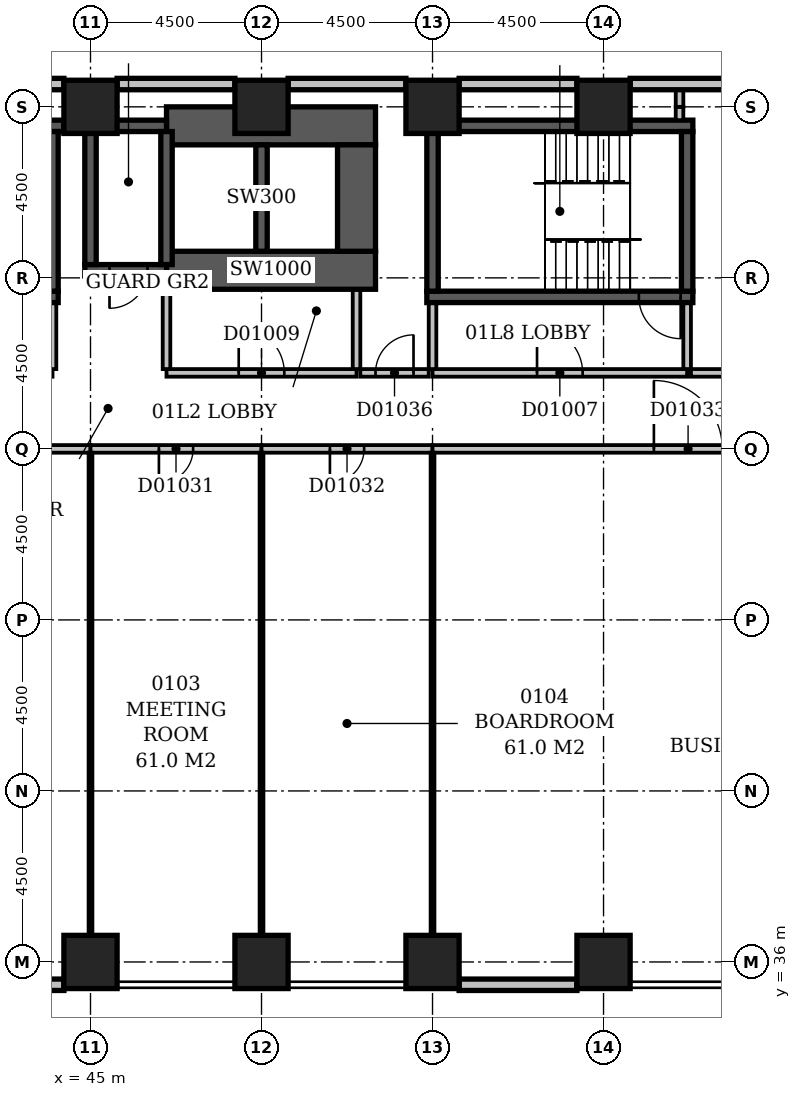
"""IFC4 building model, lengths in metres.
Left out: names, types, materials, properties, quantities, classifications, styles, units other than length and angle.
Written with IfcOpenShell. Run it as: python <this file> out.ifc"""

import sys

from ifc_helpers import new_model, si_unit, direction, frame, frame_2d, origin, origin_2d, place, context, subcontext, project, spatial, rectangle, extrude, element, fill, save


model = new_model("IFC4")
c1 = context("Model", 3, precision=1e-05, world=origin(), true_north=direction((0.0, 1.0)))
c2 = subcontext(c1, "Body", "Model", "MODEL_VIEW")
j1 = project(units=[si_unit("LENGTHUNIT", "METRE"), si_unit("PLANEANGLEUNIT", "RADIAN")], contexts=[c1])
p1 = place(None, origin())
s1 = spatial("IfcSite", under=j1, at=p1, CompositionType="ELEMENT")
p2 = place(p1, origin())
s2 = spatial("IfcBuilding", under=s1, at=p2, CompositionType="ELEMENT")
p3 = place(p2, frame((0.0, 0.0, 9.0)))
s3 = spatial("IfcBuildingStorey", under=s2, at=p3, CompositionType="ELEMENT", Elevation=9.0)
p4 = place(p3, frame((36.7, 58.0, -0.6), z_axis=(0.0, 0.0, 1.0), x_axis=(1.0, 0.0, 0.0)))
e1 = element("IfcWall", 1, at=p4, inside=s3, PredefinedType="SHEAR", context=c2, shape_type="SweptSolid", body=[
    extrude(rectangle(XDim=7.6, YDim=0.3, at=frame_2d((3.8, 0.0))), origin(), (0.0, 0.0, 1.0), 5.2),
])
p5 = place(p3, frame((37.15, 53.5, -0.6), z_axis=(0.0, 0.0, 1.0), x_axis=(1.0, 0.0, 0.0)))
e2 = element("IfcWall", 2, at=p5, inside=s3, PredefinedType="SHEAR", context=c2, shape_type="SweptSolid", body=[
    extrude(rectangle(XDim=7.0, YDim=0.3, at=frame_2d((3.5, 0.0))), origin(), (0.0, 0.0, 1.0), 5.2),
])
p6 = place(p5, frame((5.58, 0.0, 0.6)))
e3 = element("IfcOpeningElement", 3, at=p6, cuts=e2, PredefinedType="OPENING", context=c2, shape_type="SweptSolid", body=[
    extrude(rectangle(XDim=1.1, YDim=2.1, at=frame_2d((0.55, 1.05))), frame((0.0, 0.162, 0.0), z_axis=(0.0, -1.0, 0.0), x_axis=(1.0, 0.0, 0.0)), (0.0, 0.0, 1.0), 0.324),
])
p7 = place(p3, frame((44.0, 53.65, -0.6), z_axis=(0.0, 0.0, 1.0), x_axis=(0.0, 1.0, 0.0)))
e4 = element("IfcWall", 4, at=p7, inside=s3, PredefinedType="SHEAR", context=c2, shape_type="SweptSolid", body=[
    extrude(rectangle(XDim=4.2, YDim=0.3, at=frame_2d((2.1, 0.0))), origin(), (0.0, 0.0, 1.0), 5.2),
])
p8 = place(p3, frame((44.85, 54.2, -0.6), z_axis=(0.0, 0.0, 1.0), x_axis=(1.0, 0.0, 0.0)))
e5 = element("IfcWall", 5, at=p8, inside=s3, PredefinedType="SHEAR", context=c2, shape_type="SweptSolid", body=[
    extrude(rectangle(XDim=2.15, YDim=0.3, at=frame_2d((1.075, 0.0))), origin(), (0.0, 0.0, 1.0), 5.2),
])
p9 = place(p8, frame((0.65, 0.0, 0.6)))
e6 = element("IfcOpeningElement", 6, at=p9, cuts=e5, PredefinedType="OPENING", context=c2, shape_type="SweptSolid", body=[
    extrude(rectangle(XDim=1.0, YDim=2.1, at=frame_2d((0.5, 1.05))), frame((0.0, 0.162, 0.0), z_axis=(0.0, -1.0, 0.0), x_axis=(1.0, 0.0, 0.0)), (0.0, 0.0, 1.0), 0.324),
])
p10 = place(p3, frame((44.85, 58.0, -0.6), z_axis=(0.0, 0.0, 1.0), x_axis=(1.0, 0.0, 0.0)))
e7 = element("IfcWall", 7, at=p10, inside=s3, PredefinedType="SHEAR", context=c2, shape_type="SweptSolid", body=[
    extrude(rectangle(XDim=2.15, YDim=0.3, at=frame_2d((1.075, 0.0))), origin(), (0.0, 0.0, 1.0), 5.2),
])
p11 = place(p3, frame((45.0, 54.35, -0.6), z_axis=(0.0, 0.0, 1.0), x_axis=(0.0, 1.0, 0.0)))
e8 = element("IfcWall", 8, at=p11, inside=s3, PredefinedType="SHEAR", context=c2, shape_type="SweptSolid", body=[
    extrude(rectangle(XDim=3.5, YDim=0.3, at=frame_2d((1.75, 0.0))), origin(), (0.0, 0.0, 1.0), 5.2),
])
p12 = place(p3, frame((47.0, 54.2, -0.6), z_axis=(0.0, 0.0, 1.0), x_axis=(1.0, 0.0, 0.0)))
e9 = element("IfcWall", 9, at=p12, inside=s3, PredefinedType="SHEAR", context=c2, shape_type="SweptSolid", body=[
    extrude(rectangle(XDim=5.5, YDim=1.0, at=frame_2d((2.75, 0.0))), origin(), (0.0, 0.0, 1.0), 5.2),
])
p13 = place(p3, frame((47.0, 54.35, -0.6), z_axis=(0.0, 0.0, 1.0), x_axis=(0.0, 1.0, 0.0)))
e10 = element("IfcWall", 10, at=p13, inside=s3, PredefinedType="SHEAR", context=c2, shape_type="SweptSolid", body=[
    extrude(rectangle(XDim=3.5, YDim=0.3, at=frame_2d((1.75, 0.0))), origin(), (0.0, 0.0, 1.0), 5.2),
])
p14 = place(p3, frame((47.0, 58.0, -0.6), z_axis=(0.0, 0.0, 1.0), x_axis=(1.0, 0.0, 0.0)))
e11 = element("IfcWall", 11, at=p14, inside=s3, PredefinedType="SHEAR", context=c2, shape_type="SweptSolid", body=[
    extrude(rectangle(XDim=5.5, YDim=1.0, at=frame_2d((2.75, 0.0))), origin(), (0.0, 0.0, 1.0), 5.2),
])
p15 = place(p3, frame((49.5, 54.7, -0.6), z_axis=(0.0, 0.0, 1.0), x_axis=(0.0, 1.0, 0.0)))
e12 = element("IfcWall", 12, at=p15, inside=s3, PredefinedType="SHEAR", context=c2, shape_type="SweptSolid", body=[
    extrude(rectangle(XDim=2.8, YDim=0.3, at=frame_2d((1.4, 0.0))), origin(), (0.0, 0.0, 1.0), 5.2),
])
p16 = place(p3, frame((52.0, 54.7, -0.6), z_axis=(0.0, 0.0, 1.0), x_axis=(0.0, 1.0, 0.0)))
e13 = element("IfcWall", 13, at=p16, inside=s3, PredefinedType="SHEAR", context=c2, shape_type="SweptSolid", body=[
    extrude(rectangle(XDim=2.8, YDim=1.0, at=frame_2d((1.4, 0.0))), origin(), (0.0, 0.0, 1.0), 5.2),
])
p17 = place(p3, frame((53.85, 53.5, -0.6), z_axis=(0.0, 0.0, 1.0), x_axis=(1.0, 0.0, 0.0)))
e14 = element("IfcWall", 14, at=p17, inside=s3, PredefinedType="SHEAR", context=c2, shape_type="SweptSolid", body=[
    extrude(rectangle(XDim=7.0, YDim=0.3, at=frame_2d((3.5, 0.0))), origin(), (0.0, 0.0, 1.0), 5.2),
])
p18 = place(p17, frame((5.58, 0.0, 0.6)))
e15 = element("IfcOpeningElement", 15, at=p18, cuts=e14, PredefinedType="OPENING", context=c2, shape_type="SweptSolid", body=[
    extrude(rectangle(XDim=1.1, YDim=2.1, at=frame_2d((0.55, 1.05))), frame((0.0, 0.162, 0.0), z_axis=(0.0, -1.0, 0.0), x_axis=(1.0, 0.0, 0.0)), (0.0, 0.0, 1.0), 0.324),
])
p19 = place(p3, frame((53.85, 58.0, -0.6), z_axis=(0.0, 0.0, 1.0), x_axis=(1.0, 0.0, 0.0)))
e16 = element("IfcWall", 16, at=p19, inside=s3, PredefinedType="SHEAR", context=c2, shape_type="SweptSolid", body=[
    extrude(rectangle(XDim=7.0, YDim=0.3, at=frame_2d((3.5, 0.0))), origin(), (0.0, 0.0, 1.0), 5.2),
])
for number, where, z_axis, x_axis in (
    (17, (54.0, 53.65, -0.6), (0.0, 0.0, 1.0), (0.0, 1.0, 0.0)),
    (18, (60.7, 53.65, -0.6), (0.0, 0.0, 1.0), (0.0, 1.0, 0.0)),
):
    element("IfcWall", number, at=place(p3, frame(where, z_axis=z_axis, x_axis=x_axis)), inside=s3, PredefinedType="SHEAR", context=c2, shape_type="SweptSolid", body=[
        extrude(rectangle(XDim=4.2, YDim=0.3, at=frame_2d((2.1, 0.0))), origin(), (0.0, 0.0, 1.0), 5.2),
    ])
for number, where, z_axis, x_axis in (
    (19, (45.0, 36.0, -0.6), (0.0, 0.0, 1.0), (1.0, 0.0, 0.0)),
    (20, (49.5, 36.0, -0.6), (0.0, 0.0, 1.0), (1.0, 0.0, 0.0)),
    (21, (54.0, 36.0, -0.6), (0.0, 0.0, 1.0), (1.0, 0.0, 0.0)),
    (22, (58.5, 36.0, -0.6), (0.0, 0.0, 1.0), (1.0, 0.0, 0.0)),
    (23, (45.0, 58.5, -0.6), (0.0, 0.0, 1.0), (1.0, 0.0, 0.0)),
    (24, (49.5, 58.5, -0.6), (0.0, 0.0, 1.0), (1.0, 0.0, 0.0)),
    (25, (54.0, 58.5, -0.6), (0.0, 0.0, 1.0), (1.0, 0.0, 0.0)),
    (26, (58.5, 58.5, -0.6), (0.0, 0.0, 1.0), (1.0, 0.0, 0.0)),
):
    element("IfcColumn", number, at=place(p3, frame(where, z_axis=z_axis, x_axis=x_axis)), inside=s3, PredefinedType="COLUMN", context=c2, shape_type="SweptSolid", body=[
        extrude(rectangle(XDim=1.4, YDim=1.4, at=origin_2d()), origin(), (0.0, 0.0, 1.0), 5.2),
    ])
p20 = place(p3, frame((43.025, 35.4, 0.0), z_axis=(0.0, 0.0, 1.0), x_axis=(1.0, 0.0, 0.0)))
e27 = element("IfcWall", 27, at=p20, inside=s3, PredefinedType="STANDARD", context=c2, shape_type="SweptSolid", body=[
    extrude(rectangle(XDim=1.275, YDim=0.3, at=frame_2d((0.638, 0.0))), origin(), (0.0, 0.0, 1.0), 3.9),
])
for number, where, z_axis, x_axis in (
    (28, (54.7, 35.4, 0.0), (0.0, 0.0, 1.0), (1.0, 0.0, 0.0)),
    (29, (62.3, 59.1, 0.0), (0.0, 0.0, 1.0), (-1.0, 0.0, 0.0)),
    (30, (57.8, 59.1, 0.0), (0.0, 0.0, 1.0), (-1.0, 0.0, 0.0)),
    (31, (53.3, 59.1, 0.0), (0.0, 0.0, 1.0), (-1.0, 0.0, 0.0)),
    (32, (48.8, 59.1, 0.0), (0.0, 0.0, 1.0), (-1.0, 0.0, 0.0)),
    (33, (44.3, 59.1, 0.0), (0.0, 0.0, 1.0), (-1.0, 0.0, 0.0)),
):
    element("IfcWall", number, at=place(p3, frame(where, z_axis=z_axis, x_axis=x_axis)), inside=s3, PredefinedType="STANDARD", context=c2, shape_type="SweptSolid", body=[
        extrude(rectangle(XDim=3.1, YDim=0.3, at=frame_2d((1.55, 0.0))), origin(), (0.0, 0.0, 1.0), 3.9),
    ])
p21 = place(p3, frame((47.0, 51.5, 0.0), z_axis=(0.0, 0.0, 1.0), x_axis=(1.0, 0.0, 0.0)))
e34 = element("IfcWall", 34, at=p21, inside=s3, PredefinedType="PARTITIONING", context=c2, shape_type="SweptSolid", body=[
    extrude(rectangle(XDim=5.0, YDim=0.2, at=frame_2d((2.5, 0.0))), origin(), (0.0, 0.0, 1.0), 4.6),
])
p22 = place(p21, frame((1.9, 0.0, 0.0)))
e35 = element("IfcOpeningElement", 35, at=p22, cuts=e34, PredefinedType="OPENING", context=c2, shape_type="SweptSolid", body=[
    extrude(rectangle(XDim=1.2, YDim=2.1, at=frame_2d((0.6, 1.05))), frame((0.0, 0.112, 0.0), z_axis=(0.0, -1.0, 0.0), x_axis=(1.0, 0.0, 0.0)), (0.0, 0.0, 1.0), 0.224),
])
for number, where, z_axis, x_axis in (
    (36, (52.0, 51.6, 0.0), (0.0, 0.0, 1.0), (0.0, 1.0, 0.0)),
    (37, (47.0, 51.6, 0.0), (0.0, 0.0, 1.0), (0.0, 1.0, 0.0)),
):
    element("IfcWall", number, at=place(p3, frame(where, z_axis=z_axis, x_axis=x_axis)), inside=s3, PredefinedType="PARTITIONING", context=c2, shape_type="SweptSolid", body=[
        extrude(rectangle(XDim=2.08, YDim=0.2, at=frame_2d((1.04, 0.0))), origin(), (0.0, 0.0, 1.0), 4.6),
    ])
p23 = place(p3, frame((37.3, 51.5, 0.0), z_axis=(0.0, 0.0, 1.0), x_axis=(1.0, 0.0, 0.0)))
e38 = element("IfcWall", 38, at=p23, inside=s3, PredefinedType="PARTITIONING", context=c2, shape_type="SweptSolid", body=[
    extrude(rectangle(XDim=6.7, YDim=0.2, at=frame_2d((3.35, 0.0))), origin(), (0.0, 0.0, 1.0), 4.6),
])
p24 = place(p23, frame((2.75, 0.0, 0.0)))
e39 = element("IfcOpeningElement", 39, at=p24, cuts=e38, PredefinedType="OPENING", context=c2, shape_type="SweptSolid", body=[
    extrude(rectangle(XDim=1.2, YDim=2.1, at=frame_2d((0.6, 1.05))), frame((0.0, 0.112, 0.0), z_axis=(0.0, -1.0, 0.0), x_axis=(1.0, 0.0, 0.0)), (0.0, 0.0, 1.0), 0.224),
])
p25 = place(p3, frame((44.0, 51.6, 0.0), z_axis=(0.0, 0.0, 1.0), x_axis=(0.0, 1.0, 0.0)))
e40 = element("IfcWall", 40, at=p25, inside=s3, PredefinedType="PARTITIONING", context=c2, shape_type="SweptSolid", body=[
    extrude(rectangle(XDim=1.73, YDim=0.2, at=frame_2d((0.865, 0.0))), origin(), (0.0, 0.0, 1.0), 4.6),
])
p26 = place(p3, frame((54.0, 51.5, 0.0), z_axis=(0.0, 0.0, 1.0), x_axis=(1.0, 0.0, 0.0)))
e41 = element("IfcWall", 41, at=p26, inside=s3, PredefinedType="PARTITIONING", context=c2, shape_type="SweptSolid", body=[
    extrude(rectangle(XDim=6.7, YDim=0.2, at=frame_2d((3.35, 0.0))), origin(), (0.0, 0.0, 1.0), 4.6),
])
p27 = place(p26, frame((2.75, 0.0, 0.0)))
e42 = element("IfcOpeningElement", 42, at=p27, cuts=e41, PredefinedType="OPENING", context=c2, shape_type="SweptSolid", body=[
    extrude(rectangle(XDim=1.2, YDim=2.1, at=frame_2d((0.6, 1.05))), frame((0.0, 0.112, 0.0), z_axis=(0.0, -1.0, 0.0), x_axis=(1.0, 0.0, 0.0)), (0.0, 0.0, 1.0), 0.224),
])
p28 = place(p3, frame((60.7, 51.6, 0.0), z_axis=(0.0, 0.0, 1.0), x_axis=(0.0, 1.0, 0.0)))
e43 = element("IfcWall", 43, at=p28, inside=s3, PredefinedType="PARTITIONING", context=c2, shape_type="SweptSolid", body=[
    extrude(rectangle(XDim=1.73, YDim=0.2, at=frame_2d((0.865, 0.0))), origin(), (0.0, 0.0, 1.0), 4.6),
])
p29 = place(p3, frame((54.0, 51.6, 0.0), z_axis=(0.0, 0.0, 1.0), x_axis=(0.0, 1.0, 0.0)))
e44 = element("IfcWall", 44, at=p29, inside=s3, PredefinedType="PARTITIONING", context=c2, shape_type="SweptSolid", body=[
    extrude(rectangle(XDim=1.73, YDim=0.2, at=frame_2d((0.865, 0.0))), origin(), (0.0, 0.0, 1.0), 3.9),
])
p30 = place(p3, frame((22.5, 49.5, 0.0), z_axis=(0.0, 0.0, 1.0), x_axis=(1.0, 0.0, 0.0)))
e45 = element("IfcWall", 45, at=p30, inside=s3, PredefinedType="PARTITIONING", context=c2, shape_type="SweptSolid", body=[
    extrude(rectangle(XDim=22.5, YDim=0.2, at=frame_2d((11.25, 0.0))), origin(), (0.0, 0.0, 1.0), 4.6),
])
p31 = place(p30, frame((10.35, 0.0, 0.0)))
e46 = element("IfcOpeningElement", 46, at=p31, cuts=e45, PredefinedType="OPENING", context=c2, shape_type="SweptSolid", body=[
    extrude(rectangle(XDim=1.8, YDim=2.4, at=frame_2d((0.9, 1.2))), frame((0.0, 0.112, 0.0), z_axis=(0.0, -1.0, 0.0), x_axis=(1.0, 0.0, 0.0)), (0.0, 0.0, 1.0), 0.224),
])
p32 = place(p3, frame((45.0, 49.4, 0.0), z_axis=(0.0, 0.0, 1.0), x_axis=(0.0, -1.0, 0.0)))
e47 = element("IfcWall", 47, at=p32, inside=s3, PredefinedType="PARTITIONING", context=c2, shape_type="SweptSolid", body=[
    extrude(rectangle(XDim=13.4, YDim=0.1, at=frame_2d((6.7, 0.0))), origin(), (0.0, 0.0, 1.0), 3.9),
])
p33 = place(p3, frame((45.0, 49.5, 0.0), z_axis=(0.0, 0.0, 1.0), x_axis=(1.0, 0.0, 0.0)))
e48 = element("IfcWall", 48, at=p33, inside=s3, PredefinedType="PARTITIONING", context=c2, shape_type="SweptSolid", body=[
    extrude(rectangle(XDim=4.5, YDim=0.2, at=frame_2d((2.25, 0.0))), origin(), (0.0, 0.0, 1.0), 4.6),
])
p34 = place(p33, frame((1.8, 0.0, 0.0)))
e49 = element("IfcOpeningElement", 49, at=p34, cuts=e48, PredefinedType="OPENING", context=c2, shape_type="SweptSolid", body=[
    extrude(rectangle(XDim=0.9, YDim=2.1, at=frame_2d((0.45, 1.05))), frame((0.0, 0.112, 0.0), z_axis=(0.0, -1.0, 0.0), x_axis=(1.0, 0.0, 0.0)), (0.0, 0.0, 1.0), 0.224),
])
p35 = place(p3, frame((49.5, 49.4, 0.0), z_axis=(0.0, 0.0, 1.0), x_axis=(0.0, -1.0, 0.0)))
e50 = element("IfcWall", 50, at=p35, inside=s3, PredefinedType="PARTITIONING", context=c2, shape_type="SweptSolid", body=[
    extrude(rectangle(XDim=13.4, YDim=0.1, at=frame_2d((6.7, 0.0))), origin(), (0.0, 0.0, 1.0), 4.6),
])
p36 = place(p3, frame((49.5, 49.5, 0.0), z_axis=(0.0, 0.0, 1.0), x_axis=(1.0, 0.0, 0.0)))
e51 = element("IfcWall", 51, at=p36, inside=s3, PredefinedType="PARTITIONING", context=c2, shape_type="SweptSolid", body=[
    extrude(rectangle(XDim=4.5, YDim=0.2, at=frame_2d((2.25, 0.0))), origin(), (0.0, 0.0, 1.0), 4.6),
])
p37 = place(p36, frame((1.8, 0.0, 0.0)))
e52 = element("IfcOpeningElement", 52, at=p37, cuts=e51, PredefinedType="OPENING", context=c2, shape_type="SweptSolid", body=[
    extrude(rectangle(XDim=0.9, YDim=2.1, at=frame_2d((0.45, 1.05))), frame((0.0, 0.112, 0.0), z_axis=(0.0, -1.0, 0.0), x_axis=(1.0, 0.0, 0.0)), (0.0, 0.0, 1.0), 0.224),
])
p38 = place(p3, frame((54.0, 49.4, 0.0), z_axis=(0.0, 0.0, 1.0), x_axis=(0.0, -1.0, 0.0)))
e53 = element("IfcWall", 53, at=p38, inside=s3, PredefinedType="PARTITIONING", context=c2, shape_type="SweptSolid", body=[
    extrude(rectangle(XDim=13.4, YDim=0.1, at=frame_2d((6.7, 0.0))), origin(), (0.0, 0.0, 1.0), 3.9),
])
p39 = place(p3, frame((54.0, 49.5, 0.0), z_axis=(0.0, 0.0, 1.0), x_axis=(1.0, 0.0, 0.0)))
e54 = element("IfcWall", 54, at=p39, inside=s3, PredefinedType="PARTITIONING", context=c2, shape_type="SweptSolid", body=[
    extrude(rectangle(XDim=13.5, YDim=0.2, at=frame_2d((6.75, 0.0))), origin(), (0.0, 0.0, 1.0), 4.6),
])
p40 = place(p39, frame((5.825, 0.0, 0.0)))
e55 = element("IfcOpeningElement", 55, at=p40, cuts=e54, PredefinedType="OPENING", context=c2, shape_type="SweptSolid", body=[
    extrude(rectangle(XDim=1.8, YDim=2.4, at=frame_2d((0.9, 1.2))), frame((0.0, 0.112, 0.0), z_axis=(0.0, -1.0, 0.0), x_axis=(1.0, 0.0, 0.0)), (0.0, 0.0, 1.0), 0.224),
])
p41 = place(p3, frame((53.9, 51.5, 0.0), z_axis=(0.0, 0.0, 1.0), x_axis=(-1.0, 0.0, 0.0)))
e56 = element("IfcWall", 56, at=p41, inside=s3, PredefinedType="PARTITIONING", context=c2, shape_type="SweptSolid", body=[
    extrude(rectangle(XDim=1.8, YDim=0.2, at=frame_2d((0.9, 0.0))), origin(), (0.0, 0.0, 1.0), 4.6),
])
p42 = place(p41, frame((0.4, 0.0, 0.0)))
e57 = element("IfcOpeningElement", 57, at=p42, cuts=e56, PredefinedType="OPENING", context=c2, shape_type="SweptSolid", body=[
    extrude(rectangle(XDim=1.0, YDim=2.1, at=frame_2d((0.5, 1.05))), frame((0.0, 0.112, 0.0), z_axis=(0.0, -1.0, 0.0), x_axis=(1.0, 0.0, 0.0)), (0.0, 0.0, 1.0), 0.224),
])
p43 = place(p3, frame((67.5, 51.5, 0.0), z_axis=(0.0, 0.0, 1.0), x_axis=(-1.0, 0.0, 0.0)))
e58 = element("IfcWall", 58, at=p43, inside=s3, PredefinedType="PARTITIONING", context=c2, shape_type="SweptSolid", body=[
    extrude(rectangle(XDim=6.7, YDim=0.2, at=frame_2d((3.35, 0.0))), origin(), (0.0, 0.0, 1.0), 4.6),
])
p44 = place(p43, frame((2.85, 0.0, 0.0)))
e59 = element("IfcOpeningElement", 59, at=p44, cuts=e58, PredefinedType="OPENING", context=c2, shape_type="SweptSolid", body=[
    extrude(rectangle(XDim=1.0, YDim=2.1, at=frame_2d((0.5, 1.05))), frame((0.0, 0.112, 0.0), z_axis=(0.0, -1.0, 0.0), x_axis=(1.0, 0.0, 0.0)), (0.0, 0.0, 1.0), 0.224),
])
p45 = place(p3, frame((60.5, 58.15, 0.0), z_axis=(0.0, 0.0, 1.0), x_axis=(0.0, 1.0, 0.0)))
e60 = element("IfcWall", 60, at=p45, inside=s3, PredefinedType="PARTITIONING", context=c2, shape_type="SweptSolid", body=[
    extrude(rectangle(XDim=0.35, YDim=0.2, at=frame_2d((0.175, 0.0))), origin(), (0.0, 0.0, 1.0), 4.6),
])
p46 = place(p3, frame((60.5, 58.5, 0.0), z_axis=(0.0, 0.0, 1.0), x_axis=(0.0, 1.0, 0.0)))
e61 = element("IfcWall", 61, at=p46, inside=s3, PredefinedType="PARTITIONING", context=c2, shape_type="SweptSolid", body=[
    extrude(rectangle(XDim=0.45, YDim=0.2, at=frame_2d((0.225, 0.0))), origin(), (0.0, 0.0, 1.0), 4.6),
])
p47 = place(p27, origin())
e62 = element("IfcDoor", 62, at=p47, inside=s3, OperationType="SINGLE_SWING_LEFT", PredefinedType="DOOR", context=c2, shape_type="SweptSolid", body=[
    extrude(rectangle(XDim=1.2, YDim=2.1, at=frame_2d((0.6, 1.05))), frame((0.0, 0.025, 0.0), z_axis=(0.0, -1.0, 0.0), x_axis=(1.0, 0.0, 0.0)), (0.0, 0.0, 1.0), 0.05),
])
fill(e42, e62)
p48 = place(p22, origin())
e63 = element("IfcDoor", 63, at=p48, inside=s3, OperationType="SINGLE_SWING_LEFT", PredefinedType="DOOR", context=c2, shape_type="SweptSolid", body=[
    extrude(rectangle(XDim=1.2, YDim=2.1, at=frame_2d((0.6, 1.05))), frame((0.0, 0.025, 0.0), z_axis=(0.0, -1.0, 0.0), x_axis=(1.0, 0.0, 0.0)), (0.0, 0.0, 1.0), 0.05),
])
fill(e35, e63)
p49 = place(p9, frame((1.0, 0.0, 0.0), z_axis=(0.0, 0.0, 1.0), x_axis=(-1.0, 0.0, 0.0)))
e64 = element("IfcDoor", 64, at=p49, inside=s3, OperationType="SINGLE_SWING_RIGHT", PredefinedType="DOOR", context=c2, shape_type="SweptSolid", body=[
    extrude(rectangle(XDim=1.0, YDim=2.1, at=frame_2d((0.5, 1.05))), frame((0.0, 0.025, 0.0), z_axis=(0.0, -1.0, 0.0), x_axis=(1.0, 0.0, 0.0)), (0.0, 0.0, 1.0), 0.05),
])
fill(e6, e64)
p50 = place(p18, origin())
e65 = element("IfcDoor", 65, at=p50, inside=s3, OperationType="SINGLE_SWING_RIGHT", PredefinedType="DOOR", context=c2, shape_type="SweptSolid", body=[
    extrude(rectangle(XDim=1.1, YDim=2.1, at=frame_2d((0.55, 1.05))), frame((0.0, 0.025, 0.0), z_axis=(0.0, -1.0, 0.0), x_axis=(1.0, 0.0, 0.0)), (0.0, 0.0, 1.0), 0.05),
])
fill(e15, e65)
p51 = place(p34, frame((0.9, 0.0, 0.0), z_axis=(0.0, 0.0, 1.0), x_axis=(-1.0, 0.0, 0.0)))
e66 = element("IfcDoor", 66, at=p51, inside=s3, OperationType="SINGLE_SWING_RIGHT", PredefinedType="DOOR", context=c2, shape_type="SweptSolid", body=[
    extrude(rectangle(XDim=0.9, YDim=2.1, at=frame_2d((0.45, 1.05))), frame((0.0, 0.025, 0.0), z_axis=(0.0, -1.0, 0.0), x_axis=(1.0, 0.0, 0.0)), (0.0, 0.0, 1.0), 0.05),
])
fill(e49, e66)
p52 = place(p37, frame((0.9, 0.0, 0.0), z_axis=(0.0, 0.0, 1.0), x_axis=(-1.0, 0.0, 0.0)))
e67 = element("IfcDoor", 67, at=p52, inside=s3, OperationType="SINGLE_SWING_RIGHT", PredefinedType="DOOR", context=c2, shape_type="SweptSolid", body=[
    extrude(rectangle(XDim=0.9, YDim=2.1, at=frame_2d((0.45, 1.05))), frame((0.0, 0.025, 0.0), z_axis=(0.0, -1.0, 0.0), x_axis=(1.0, 0.0, 0.0)), (0.0, 0.0, 1.0), 0.05),
])
fill(e52, e67)
p53 = place(p40, origin())
e68 = element("IfcDoor", 68, at=p53, inside=s3, OperationType="DOUBLE_DOOR_SINGLE_SWING", PredefinedType="DOOR", context=c2, shape_type="SweptSolid", body=[
    extrude(rectangle(XDim=1.8, YDim=2.4, at=frame_2d((0.9, 1.2))), frame((0.0, 0.025, 0.0), z_axis=(0.0, -1.0, 0.0), x_axis=(1.0, 0.0, 0.0)), (0.0, 0.0, 1.0), 0.05),
])
fill(e55, e68)
p54 = place(p42, frame((1.0, 0.0, 0.0), z_axis=(0.0, 0.0, 1.0), x_axis=(-1.0, 0.0, 0.0)))
e69 = element("IfcDoor", 69, at=p54, inside=s3, OperationType="SINGLE_SWING_RIGHT", PredefinedType="DOOR", context=c2, shape_type="SweptSolid", body=[
    extrude(rectangle(XDim=1.0, YDim=2.1, at=frame_2d((0.5, 1.05))), frame((0.0, 0.025, 0.0), z_axis=(0.0, -1.0, 0.0), x_axis=(1.0, 0.0, 0.0)), (0.0, 0.0, 1.0), 0.05),
])
fill(e57, e69)
save(model, sys.argv[1])
